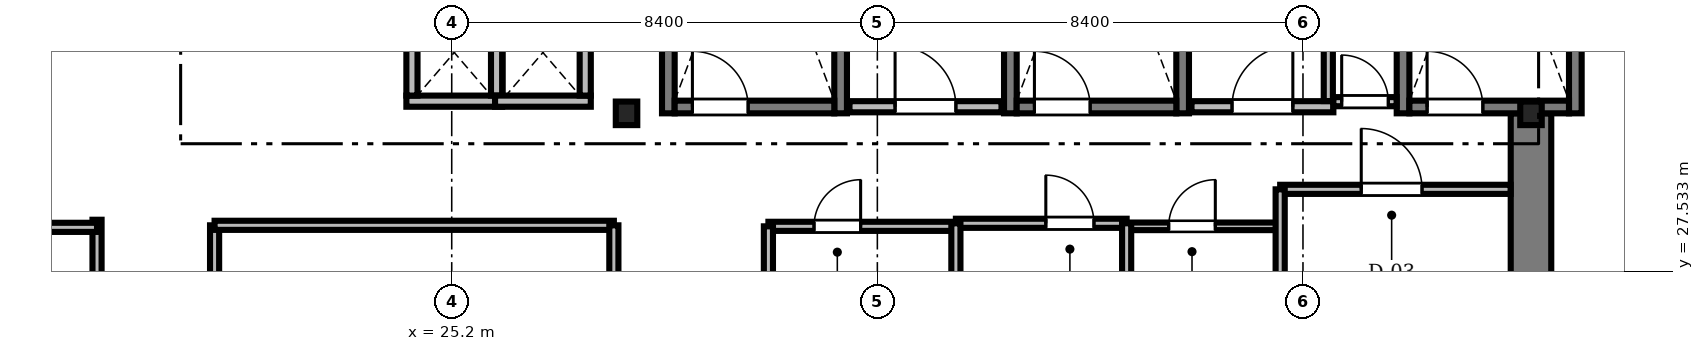
"""IFC4 building model, lengths in metres.
Left out: names, types, materials, properties, quantities, classifications, styles, units other than length and angle.
Written with IfcOpenShell. Run it as: python <this file> out.ifc"""

import sys

from ifc_helpers import new_model, si_unit, direction, frame, frame_2d, origin, origin_2d, place, context, subcontext, project, spatial, rectangle, i_section, extrude, source, transform, mapped, element, fill, save


model = new_model("IFC4")
c1 = context("Model", 3, precision=1e-05, world=origin(), true_north=direction((0.0, 1.0)))
c2 = subcontext(c1, "Body", "Model", "MODEL_VIEW")
j1 = project(units=[si_unit("LENGTHUNIT", "METRE"), si_unit("PLANEANGLEUNIT", "RADIAN")], contexts=[c1])
p1 = place(None, origin())
s1 = spatial("IfcSite", under=j1, at=p1, CompositionType="ELEMENT")
p2 = place(p1, origin())
s2 = spatial("IfcBuilding", under=s1, at=p2, CompositionType="ELEMENT")
p3 = place(p2, frame((0.0, 0.0, 103.7)))
s3 = spatial("IfcBuildingStorey", under=s2, at=p3, CompositionType="ELEMENT", Elevation=103.7)
m1 = source(origin(), c2, "Body", "SweptSolid", [
    extrude(rectangle(XDim=13.15, YDim=0.8, at=frame_2d((6.575, 0.0))), origin(), (0.0, 0.0, 1.0), 3.56),
])
p4 = place(p3, frame((46.5, 17.5, 0.0), z_axis=(0.0, 0.0, 1.0), x_axis=(0.0, 1.0, 0.0)))
e1 = element("IfcWall", 1, at=p4, inside=s3, PredefinedType="SHEAR", context=c2, shape_type="MappedRepresentation", body=[
    mapped(m1, transform((0.0, 0.0, 0.0), scale=1.0)),
])
m2 = source(origin(), c2, "Body", "SweptSolid", [
    extrude(i_section(OverallWidth=0.424, OverallDepth=0.465, WebThickness=0.035, FlangeThickness=0.056, FilletRadius=0.015, at=origin_2d()), origin(), (0.0, 0.0, 1.0), 3.56),
])
for number, where, z_axis, x_axis in (
    (2, (28.65, 30.65, 0.0), (0.0, 0.0, 1.0), (1.0, 0.0, 0.0)),
    (3, (46.5, 30.65, 0.0), (0.0, 0.0, 1.0), (1.0, 0.0, 0.0)),
):
    element("IfcColumn", number, at=place(p3, frame(where, z_axis=z_axis, x_axis=x_axis)), inside=s3, PredefinedType="COLUMN", context=c2, shape_type="MappedRepresentation", body=[
        mapped(m2, transform((0.0, 0.0, 0.0), scale=1.0)),
    ])
m3 = source(origin(), c2, "Body", "SweptSolid", [
    extrude(rectangle(XDim=9.25, YDim=0.25, at=frame_2d((4.625, 0.0))), origin(), (0.0, 0.0, 1.0), 3.6),
])
for number, where, z_axis, x_axis in (
    (4, (29.475, 30.65, 0.0), (0.0, 0.0, 1.0), (0.0, 1.0, 0.0)),
    (5, (32.875, 30.65, 0.0), (0.0, 0.0, 1.0), (0.0, 1.0, 0.0)),
):
    element("IfcWall", number, at=place(p3, frame(where, z_axis=z_axis, x_axis=x_axis)), inside=s3, PredefinedType="SOLIDWALL", context=c2, shape_type="MappedRepresentation", body=[
        mapped(m3, transform((0.0, 0.0, 0.0), scale=1.0)),
    ])
m4 = source(origin(), c2, "Body", "SweptSolid", [
    extrude(rectangle(XDim=3.15, YDim=0.25, at=frame_2d((1.575, 0.0))), origin(), (0.0, 0.0, 1.0), 3.6),
])
p5 = place(p3, frame((29.6, 30.775, 0.0), z_axis=(0.0, 0.0, 1.0), x_axis=(1.0, 0.0, 0.0)))
e6 = element("IfcWall", 6, at=p5, inside=s3, PredefinedType="SOLIDWALL", context=c2, shape_type="MappedRepresentation", body=[
    mapped(m4, transform((0.0, 0.0, 0.0), scale=1.0)),
])
m5 = source(origin(), c2, "Body", "SweptSolid", [
    extrude(rectangle(XDim=1.1, YDim=2.2, at=frame_2d((0.55, 1.1))), frame((0.0, 0.135, 0.0), z_axis=(0.0, -1.0, 0.0), x_axis=(1.0, 0.0, 0.0)), (0.0, 0.0, 1.0), 0.27),
])
p6 = place(p5, frame((0.35, 0.0, 0.0)))
e7 = element("IfcOpeningElement", 7, at=p6, cuts=e6, PredefinedType="OPENING", context=c2, shape_type="MappedRepresentation", body=[
    mapped(m5, transform((0.0, 0.0, 0.0), scale=1.0)),
])
for number, where, z_axis, x_axis in (
    (8, (36.225, 30.65, 0.0), (0.0, 0.0, 1.0), (0.0, 1.0, 0.0)),
    (9, (39.625, 30.65, 0.0), (0.0, 0.0, 1.0), (0.0, 1.0, 0.0)),
):
    element("IfcWall", number, at=place(p3, frame(where, z_axis=z_axis, x_axis=x_axis)), inside=s3, PredefinedType="SOLIDWALL", context=c2, shape_type="MappedRepresentation", body=[
        mapped(m3, transform((0.0, 0.0, 0.0), scale=1.0)),
    ])
p7 = place(p3, frame((36.35, 30.775, 0.0), z_axis=(0.0, 0.0, 1.0), x_axis=(1.0, 0.0, 0.0)))
e10 = element("IfcWall", 10, at=p7, inside=s3, PredefinedType="SOLIDWALL", context=c2, shape_type="MappedRepresentation", body=[
    mapped(m4, transform((0.0, 0.0, 0.0), scale=1.0)),
])
p8 = place(p7, frame((0.35, 0.0, 0.0)))
e11 = element("IfcOpeningElement", 11, at=p8, cuts=e10, PredefinedType="OPENING", context=c2, shape_type="MappedRepresentation", body=[
    mapped(m5, transform((0.0, 0.0, 0.0), scale=1.0)),
])
for number, where, z_axis, x_axis in (
    (12, (43.975, 30.65, 0.0), (0.0, 0.0, 1.0), (0.0, 1.0, 0.0)),
    (13, (47.375, 30.65, 0.0), (0.0, 0.0, 1.0), (0.0, 1.0, 0.0)),
):
    element("IfcWall", number, at=place(p3, frame(where, z_axis=z_axis, x_axis=x_axis)), inside=s3, PredefinedType="SOLIDWALL", context=c2, shape_type="MappedRepresentation", body=[
        mapped(m3, transform((0.0, 0.0, 0.0), scale=1.0)),
    ])
p9 = place(p3, frame((44.1, 30.775, 0.0), z_axis=(0.0, 0.0, 1.0), x_axis=(1.0, 0.0, 0.0)))
e14 = element("IfcWall", 14, at=p9, inside=s3, PredefinedType="SOLIDWALL", context=c2, shape_type="MappedRepresentation", body=[
    mapped(m4, transform((0.0, 0.0, 0.0), scale=1.0)),
])
p10 = place(p9, frame((0.35, 0.0, 0.0)))
e15 = element("IfcOpeningElement", 15, at=p10, cuts=e14, PredefinedType="OPENING", context=c2, shape_type="MappedRepresentation", body=[
    mapped(m5, transform((0.0, 0.0, 0.0), scale=1.0)),
])
m6 = source(origin(), c2, "Body", "SweptSolid", [
    extrude(rectangle(XDim=3.0, YDim=0.22, at=frame_2d((1.5, 0.0))), origin(), (0.0, 0.0, 1.0), 3.56),
])
p11 = place(p3, frame((33.05, 30.78, 0.0), z_axis=(0.0, 0.0, 1.0), x_axis=(1.0, 0.0, 0.0)))
e16 = element("IfcWall", 16, at=p11, inside=s3, PredefinedType="SOLIDWALL", context=c2, shape_type="MappedRepresentation", body=[
    mapped(m6, transform((0.0, 0.0, 0.0), scale=1.0)),
])
m7 = source(origin(), c2, "Body", "SweptSolid", [
    extrude(rectangle(XDim=1.2, YDim=2.2, at=frame_2d((0.6, 1.1))), frame((0.0, 0.12, 0.0), z_axis=(0.0, -1.0, 0.0), x_axis=(1.0, 0.0, 0.0)), (0.0, 0.0, 1.0), 0.24),
])
p12 = place(p11, frame((0.9, 0.0, 0.0)))
e17 = element("IfcOpeningElement", 17, at=p12, cuts=e16, PredefinedType="OPENING", context=c2, shape_type="MappedRepresentation", body=[
    mapped(m7, transform((0.0, 0.0, 0.0), scale=1.0)),
])
m8 = source(origin(), c2, "Body", "SweptSolid", [
    extrude(rectangle(XDim=2.8, YDim=0.22, at=frame_2d((1.4, 0.0))), origin(), (0.0, 0.0, 1.0), 3.56),
])
p13 = place(p3, frame((39.8, 30.78, 0.0), z_axis=(0.0, 0.0, 1.0), x_axis=(1.0, 0.0, 0.0)))
e18 = element("IfcWall", 18, at=p13, inside=s3, PredefinedType="SOLIDWALL", context=c2, shape_type="MappedRepresentation", body=[
    mapped(m8, transform((0.0, 0.0, 0.0), scale=1.0)),
])
p14 = place(p13, frame((0.8, 0.0, 0.0)))
e19 = element("IfcOpeningElement", 19, at=p14, cuts=e18, PredefinedType="OPENING", context=c2, shape_type="MappedRepresentation", body=[
    mapped(m7, transform((0.0, 0.0, 0.0), scale=1.0)),
])
m9 = source(origin(), c2, "Body", "SweptSolid", [
    extrude(rectangle(XDim=1.89, YDim=0.22, at=frame_2d((0.945, 0.0))), origin(), (0.0, 0.0, 1.0), 3.56),
])
p15 = place(p3, frame((24.305, 30.89, 0.0), z_axis=(0.0, 0.0, 1.0), x_axis=(1.0, 0.0, 0.0)))
e20 = element("IfcWall", 20, at=p15, inside=s3, PredefinedType="SOLIDWALL", context=c2, shape_type="MappedRepresentation", body=[
    mapped(m9, transform((0.0, 0.0, 0.0), scale=1.0)),
])
m10 = source(origin(), c2, "Body", "SweptSolid", [
    extrude(rectangle(XDim=1.7, YDim=0.22, at=frame_2d((0.85, 0.0))), origin(), (0.0, 0.0, 1.0), 3.56),
])
for number, where, z_axis, x_axis in (
    (21, (24.415, 31.0, 0.0), (0.0, 0.0, 1.0), (0.0, 1.0, 0.0)),
    (22, (26.085, 31.0, 0.0), (0.0, 0.0, 1.0), (0.0, 1.0, 0.0)),
):
    element("IfcWall", number, at=place(p3, frame(where, z_axis=z_axis, x_axis=x_axis)), inside=s3, PredefinedType="SOLIDWALL", context=c2, shape_type="MappedRepresentation", body=[
        mapped(m10, transform((0.0, 0.0, 0.0), scale=1.0)),
    ])
p16 = place(p3, frame((26.055, 30.89, 0.0), z_axis=(0.0, 0.0, 1.0), x_axis=(1.0, 0.0, 0.0)))
e23 = element("IfcWall", 23, at=p16, inside=s3, PredefinedType="SOLIDWALL", context=c2, shape_type="MappedRepresentation", body=[
    mapped(m9, transform((0.0, 0.0, 0.0), scale=1.0)),
])
p17 = place(p3, frame((27.835, 31.0, 0.0), z_axis=(0.0, 0.0, 1.0), x_axis=(0.0, 1.0, 0.0)))
e24 = element("IfcWall", 24, at=p17, inside=s3, PredefinedType="SOLIDWALL", context=c2, shape_type="MappedRepresentation", body=[
    mapped(m10, transform((0.0, 0.0, 0.0), scale=1.0)),
])
m11 = source(origin(), c2, "Body", "SweptSolid", [
    extrude(rectangle(XDim=4.548, YDim=0.18, at=frame_2d((2.274, 0.0))), origin(), (0.0, 0.0, 1.0), 3.192),
])
p18 = place(p3, frame((41.55, 29.15, 0.0), z_axis=(0.0, 0.0, 1.0), x_axis=(1.0, 0.0, 0.0)))
e25 = element("IfcWall", 25, at=p18, inside=s3, PredefinedType="PARTITIONING", context=c2, shape_type="MappedRepresentation", body=[
    mapped(m11, transform((0.0, 0.0, 0.0), scale=1.0)),
])
m12 = source(origin(), c2, "Body", "SweptSolid", [
    extrude(rectangle(XDim=1.2, YDim=2.2, at=frame_2d((0.6, 1.1))), frame((0.0, 0.1, 0.0), z_axis=(0.0, -1.0, 0.0), x_axis=(1.0, 0.0, 0.0)), (0.0, 0.0, 1.0), 0.2),
])
p19 = place(p18, frame((1.6, 0.0, 0.0)))
e26 = element("IfcOpeningElement", 26, at=p19, cuts=e25, PredefinedType="OPENING", context=c2, shape_type="MappedRepresentation", body=[
    mapped(m12, transform((0.0, 0.0, 0.0), scale=1.0)),
])
m13 = source(origin(), c2, "Body", "SweptSolid", [
    extrude(rectangle(XDim=4.24, YDim=0.18, at=frame_2d((2.12, 0.0))), origin(), (0.0, 0.0, 1.0), 2.952),
])
p20 = place(p3, frame((20.52, 24.2, 0.0), z_axis=(0.0, 0.0, 1.0), x_axis=(0.0, 1.0, 0.0)))
e27 = element("IfcWall", 27, at=p20, inside=s3, PredefinedType="PARTITIONING", context=c2, shape_type="MappedRepresentation", body=[
    mapped(m13, transform((0.0, 0.0, 0.0), scale=1.0)),
])
m14 = source(origin(), c2, "Body", "SweptSolid", [
    extrude(rectangle(XDim=1.05, YDim=2.2, at=frame_2d((0.525, 1.1))), frame((0.0, 0.1, 0.0), z_axis=(0.0, -1.0, 0.0), x_axis=(1.0, 0.0, 0.0)), (0.0, 0.0, 1.0), 0.2),
])
p21 = place(p20, frame((1.4, 0.0, 0.0)))
e28 = element("IfcOpeningElement", 28, at=p21, cuts=e27, PredefinedType="OPENING", context=c2, shape_type="MappedRepresentation", body=[
    mapped(m14, transform((0.0, 0.0, 0.0), scale=1.0)),
])
m15 = source(origin(), c2, "Body", "SweptSolid", [
    extrude(rectangle(XDim=3.7, YDim=0.18, at=frame_2d((1.85, 0.0))), origin(), (0.0, 0.0, 1.0), 3.192),
])
p22 = place(p3, frame((31.45, 28.42, 0.0), z_axis=(0.0, 0.0, 1.0), x_axis=(1.0, 0.0, 0.0)))
e29 = element("IfcWall", 29, at=p22, inside=s3, PredefinedType="PARTITIONING", context=c2, shape_type="MappedRepresentation", body=[
    mapped(m15, transform((0.0, 0.0, 0.0), scale=1.0)),
])
m16 = source(origin(), c2, "Body", "SweptSolid", [
    extrude(rectangle(XDim=0.92, YDim=2.1, at=frame_2d((0.46, 1.05))), frame((0.0, 0.1, 0.0), z_axis=(0.0, -1.0, 0.0), x_axis=(1.0, 0.0, 0.0)), (0.0, 0.0, 1.0), 0.2),
])
p23 = place(p22, frame((0.9, 0.0, 0.0)))
e30 = element("IfcOpeningElement", 30, at=p23, cuts=e29, PredefinedType="OPENING", context=c2, shape_type="MappedRepresentation", body=[
    mapped(m16, transform((0.0, 0.0, 0.0), scale=1.0)),
])
m17 = source(origin(), c2, "Body", "SweptSolid", [
    extrude(rectangle(XDim=3.37, YDim=0.18, at=frame_2d((1.685, 0.0))), origin(), (0.0, 0.0, 1.0), 3.56),
])
p24 = place(p3, frame((35.15, 28.48, 0.0), z_axis=(0.0, 0.0, 1.0), x_axis=(1.0, 0.0, 0.0)))
e31 = element("IfcWall", 31, at=p24, inside=s3, PredefinedType="PARTITIONING", context=c2, shape_type="MappedRepresentation", body=[
    mapped(m17, transform((0.0, 0.0, 0.0), scale=1.0)),
])
m18 = source(origin(), c2, "Body", "SweptSolid", [
    extrude(rectangle(XDim=0.95, YDim=2.15, at=frame_2d((0.475, 1.075))), frame((0.0, 0.1, 0.0), z_axis=(0.0, -1.0, 0.0), x_axis=(1.0, 0.0, 0.0)), (0.0, 0.0, 1.0), 0.2),
])
p25 = place(p24, frame((1.775, 0.0, 0.0)))
e32 = element("IfcOpeningElement", 32, at=p25, cuts=e31, PredefinedType="OPENING", context=c2, shape_type="MappedRepresentation", body=[
    mapped(m18, transform((0.0, 0.0, 0.0), scale=1.0)),
])
m19 = source(origin(), c2, "Body", "SweptSolid", [
    extrude(rectangle(XDim=3.0, YDim=0.15, at=frame_2d((1.5, 0.0))), origin(), (0.0, 0.0, 1.0), 3.56),
])
p26 = place(p3, frame((38.52, 28.42, 0.0), z_axis=(0.0, 0.0, 1.0), x_axis=(1.0, 0.0, 0.0)))
e33 = element("IfcWall", 33, at=p26, inside=s3, PredefinedType="PARTITIONING", context=c2, shape_type="MappedRepresentation", body=[
    mapped(m19, transform((0.0, 0.0, 0.0), scale=1.0)),
])
m20 = source(origin(), c2, "Body", "SweptSolid", [
    extrude(rectangle(XDim=0.92, YDim=2.1, at=frame_2d((0.46, 1.05))), frame((0.0, 0.085, 0.0), z_axis=(0.0, -1.0, 0.0), x_axis=(1.0, 0.0, 0.0)), (0.0, 0.0, 1.0), 0.17),
])
p27 = place(p26, frame((0.83, 0.0, 0.0)))
e34 = element("IfcOpeningElement", 34, at=p27, cuts=e33, PredefinedType="OPENING", context=c2, shape_type="MappedRepresentation", body=[
    mapped(m20, transform((0.0, 0.0, 0.0), scale=1.0)),
])
m21 = source(origin(), c2, "Body", "SweptSolid", [
    extrude(rectangle(XDim=1.248, YDim=0.18, at=frame_2d((0.624, 0.0))), origin(), (0.0, 0.0, 1.0), 3.56),
])
p28 = place(p3, frame((42.6, 30.88, 0.0), z_axis=(0.0, 0.0, 1.0), x_axis=(1.0, 0.0, 0.0)))
e35 = element("IfcWall", 35, at=p28, inside=s3, PredefinedType="PARTITIONING", context=c2, shape_type="MappedRepresentation", body=[
    mapped(m21, transform((0.0, 0.0, 0.0), scale=1.0)),
])
p29 = place(p28, frame((0.164, 0.0, 0.0)))
e36 = element("IfcOpeningElement", 36, at=p29, cuts=e35, PredefinedType="OPENING", context=c2, shape_type="MappedRepresentation", body=[
    mapped(m16, transform((0.0, 0.0, 0.0), scale=1.0)),
])
m22 = source(origin(), c2, "Body", "SweptSolid", [
    extrude(rectangle(XDim=14.0, YDim=0.18, at=frame_2d((7.0, 0.0))), origin(), (0.0, 0.0, 1.0), 2.952),
])
p30 = place(p3, frame((18.2, 14.55, 0.0), z_axis=(0.0, 0.0, 1.0), x_axis=(0.0, 1.0, 0.0)))
e37 = element("IfcWall", 37, at=p30, inside=s3, PredefinedType="PARTITIONING", context=c2, shape_type="MappedRepresentation", body=[
    mapped(m22, transform((0.0, 0.0, 0.0), scale=1.0)),
])
m23 = source(origin(), c2, "Body", "SweptSolid", [
    extrude(rectangle(XDim=11.47, YDim=0.18, at=frame_2d((5.735, 0.0))), origin(), (0.0, 0.0, 1.0), 2.802),
])
p31 = place(p3, frame((6.73, 28.4, 0.0), z_axis=(0.0, 0.0, 1.0), x_axis=(1.0, 0.0, 0.0)))
e38 = element("IfcWall", 38, at=p31, inside=s3, PredefinedType="PARTITIONING", context=c2, shape_type="MappedRepresentation", body=[
    mapped(m23, transform((0.0, 0.0, 0.0), scale=1.0)),
])
m24 = source(origin(), c2, "Body", "SweptSolid", [
    extrude(rectangle(XDim=7.88, YDim=0.18, at=frame_2d((3.94, 0.0))), origin(), (0.0, 0.0, 1.0), 3.56),
])
p32 = place(p3, frame((20.52, 28.44, 0.0), z_axis=(0.0, 0.0, 1.0), x_axis=(1.0, 0.0, 0.0)))
e39 = element("IfcWall", 39, at=p32, inside=s3, PredefinedType="PARTITIONING", context=c2, shape_type="MappedRepresentation", body=[
    mapped(m24, transform((0.0, 0.0, 0.0), scale=1.0)),
])
p33 = place(p3, frame((28.4, 24.2, 0.0), z_axis=(0.0, 0.0, 1.0), x_axis=(0.0, 1.0, 0.0)))
e40 = element("IfcWall", 40, at=p33, inside=s3, PredefinedType="PARTITIONING", context=c2, shape_type="MappedRepresentation", body=[
    mapped(m13, transform((0.0, 0.0, 0.0), scale=1.0)),
])
m25 = source(origin(), c2, "Body", "SweptSolid", [
    extrude(rectangle(XDim=2.35, YDim=0.18, at=frame_2d((1.175, 0.0))), origin(), (0.0, 0.0, 1.0), 2.952),
])
p34 = place(p3, frame((41.55, 26.8, 0.0), z_axis=(0.0, 0.0, 1.0), x_axis=(0.0, 1.0, 0.0)))
e41 = element("IfcWall", 41, at=p34, inside=s3, PredefinedType="PARTITIONING", context=c2, shape_type="MappedRepresentation", body=[
    mapped(m25, transform((0.0, 0.0, 0.0), scale=1.0)),
])
m26 = source(origin(), c2, "Body", "SweptSolid", [
    extrude(rectangle(XDim=1.858, YDim=0.18, at=frame_2d((0.929, 0.0))), origin(), (0.0, 0.0, 1.0), 3.56),
])
p35 = place(p3, frame((42.5, 30.892, 0.0), z_axis=(0.0, 0.0, 1.0), x_axis=(0.0, 1.0, 0.0)))
e42 = element("IfcWall", 42, at=p35, inside=s3, PredefinedType="PARTITIONING", context=c2, shape_type="MappedRepresentation", body=[
    mapped(m26, transform((0.0, 0.0, 0.0), scale=1.0)),
])
m27 = source(origin(), c2, "Body", "SweptSolid", [
    extrude(rectangle(XDim=1.66, YDim=0.18, at=frame_2d((0.83, 0.0))), origin(), (0.0, 0.0, 1.0), 3.102),
])
for number, where, z_axis, x_axis in (
    (43, (35.15, 26.82, 0.0), (0.0, 0.0, 1.0), (0.0, 1.0, 0.0)),
    (44, (38.52, 26.82, 0.0), (0.0, 0.0, 1.0), (0.0, 1.0, 0.0)),
):
    element("IfcWall", number, at=place(p3, frame(where, z_axis=z_axis, x_axis=x_axis)), inside=s3, PredefinedType="PARTITIONING", context=c2, shape_type="MappedRepresentation", body=[
        mapped(m27, transform((0.0, 0.0, 0.0), scale=1.0)),
    ])
m28 = source(origin(), c2, "Body", "SweptSolid", [
    extrude(rectangle(XDim=1.6, YDim=0.18, at=frame_2d((0.8, 0.0))), origin(), (0.0, 0.0, 1.0), 3.102),
])
p36 = place(p3, frame((31.45, 26.82, 0.0), z_axis=(0.0, 0.0, 1.0), x_axis=(0.0, 1.0, 0.0)))
e45 = element("IfcWall", 45, at=p36, inside=s3, PredefinedType="PARTITIONING", context=c2, shape_type="MappedRepresentation", body=[
    mapped(m28, transform((0.0, 0.0, 0.0), scale=1.0)),
])
m29 = source(origin(), c2, "Body", "SweptSolid", [
    extrude(rectangle(XDim=1.1, YDim=2.2, at=frame_2d((0.55, 1.1))), frame((0.0, 0.025, 0.0), z_axis=(0.0, -1.0, 0.0), x_axis=(1.0, 0.0, 0.0)), (0.0, 0.0, 1.0), 0.05),
])
p37 = place(p6, origin())
e46 = element("IfcDoor", 46, at=p37, inside=s3, OperationType="SINGLE_SWING_LEFT", PredefinedType="DOOR", context=c2, shape_type="MappedRepresentation", body=[
    mapped(m29, transform((0.0, 0.0, 0.0), scale=1.0)),
])
fill(e7, e46)
p38 = place(p8, origin())
e47 = element("IfcDoor", 47, at=p38, inside=s3, OperationType="SINGLE_SWING_LEFT", PredefinedType="DOOR", context=c2, shape_type="MappedRepresentation", body=[
    mapped(m29, transform((0.0, 0.0, 0.0), scale=1.0)),
])
fill(e11, e47)
p39 = place(p10, origin())
e48 = element("IfcDoor", 48, at=p39, inside=s3, OperationType="SINGLE_SWING_LEFT", PredefinedType="DOOR", context=c2, shape_type="MappedRepresentation", body=[
    mapped(m29, transform((0.0, 0.0, 0.0), scale=1.0)),
])
fill(e15, e48)
m30 = source(origin(), c2, "Body", "SweptSolid", [
    extrude(rectangle(XDim=1.2, YDim=2.2, at=frame_2d((0.6, 1.1))), frame((0.0, 0.025, 0.0), z_axis=(0.0, -1.0, 0.0), x_axis=(1.0, 0.0, 0.0)), (0.0, 0.0, 1.0), 0.05),
])
p40 = place(p12, origin())
e49 = element("IfcDoor", 49, at=p40, inside=s3, OperationType="SINGLE_SWING_LEFT", PredefinedType="DOOR", context=c2, shape_type="MappedRepresentation", body=[
    mapped(m30, transform((0.0, 0.0, 0.0), scale=1.0)),
])
fill(e17, e49)
p41 = place(p14, origin())
e50 = element("IfcDoor", 50, at=p41, inside=s3, OperationType="SINGLE_SWING_RIGHT", PredefinedType="DOOR", context=c2, shape_type="MappedRepresentation", body=[
    mapped(m30, transform((0.0, 0.0, 0.0), scale=1.0)),
])
fill(e19, e50)
p42 = place(p19, origin())
e51 = element("IfcDoor", 51, at=p42, inside=s3, OperationType="SINGLE_SWING_LEFT", PredefinedType="DOOR", context=c2, shape_type="MappedRepresentation", body=[
    mapped(m30, transform((0.0, 0.0, 0.0), scale=1.0)),
])
fill(e26, e51)
m31 = source(origin(), c2, "Body", "SweptSolid", [
    extrude(rectangle(XDim=0.92, YDim=2.1, at=frame_2d((0.46, 1.05))), frame((0.0, 0.025, 0.0), z_axis=(0.0, -1.0, 0.0), x_axis=(1.0, 0.0, 0.0)), (0.0, 0.0, 1.0), 0.05),
])
p43 = place(p23, origin())
e52 = element("IfcDoor", 52, at=p43, inside=s3, OperationType="SINGLE_SWING_RIGHT", PredefinedType="DOOR", context=c2, shape_type="MappedRepresentation", body=[
    mapped(m31, transform((0.0, 0.0, 0.0), scale=1.0)),
])
fill(e30, e52)
m32 = source(origin(), c2, "Body", "SweptSolid", [
    extrude(rectangle(XDim=0.95, YDim=2.15, at=frame_2d((0.475, 1.075))), frame((0.0, 0.025, 0.0), z_axis=(0.0, -1.0, 0.0), x_axis=(1.0, 0.0, 0.0)), (0.0, 0.0, 1.0), 0.05),
])
p44 = place(p25, origin())
e53 = element("IfcDoor", 53, at=p44, inside=s3, OperationType="SINGLE_SWING_LEFT", PredefinedType="DOOR", context=c2, shape_type="MappedRepresentation", body=[
    mapped(m32, transform((0.0, 0.0, 0.0), scale=1.0)),
])
fill(e32, e53)
p45 = place(p27, origin())
e54 = element("IfcDoor", 54, at=p45, inside=s3, OperationType="SINGLE_SWING_RIGHT", PredefinedType="DOOR", context=c2, shape_type="MappedRepresentation", body=[
    mapped(m31, transform((0.0, 0.0, 0.0), scale=1.0)),
])
fill(e34, e54)
p46 = place(p29, origin())
e55 = element("IfcDoor", 55, at=p46, inside=s3, OperationType="SINGLE_SWING_LEFT", PredefinedType="DOOR", context=c2, shape_type="MappedRepresentation", body=[
    mapped(m31, transform((0.0, 0.0, 0.0), scale=1.0)),
])
fill(e36, e55)
save(model, sys.argv[1])
